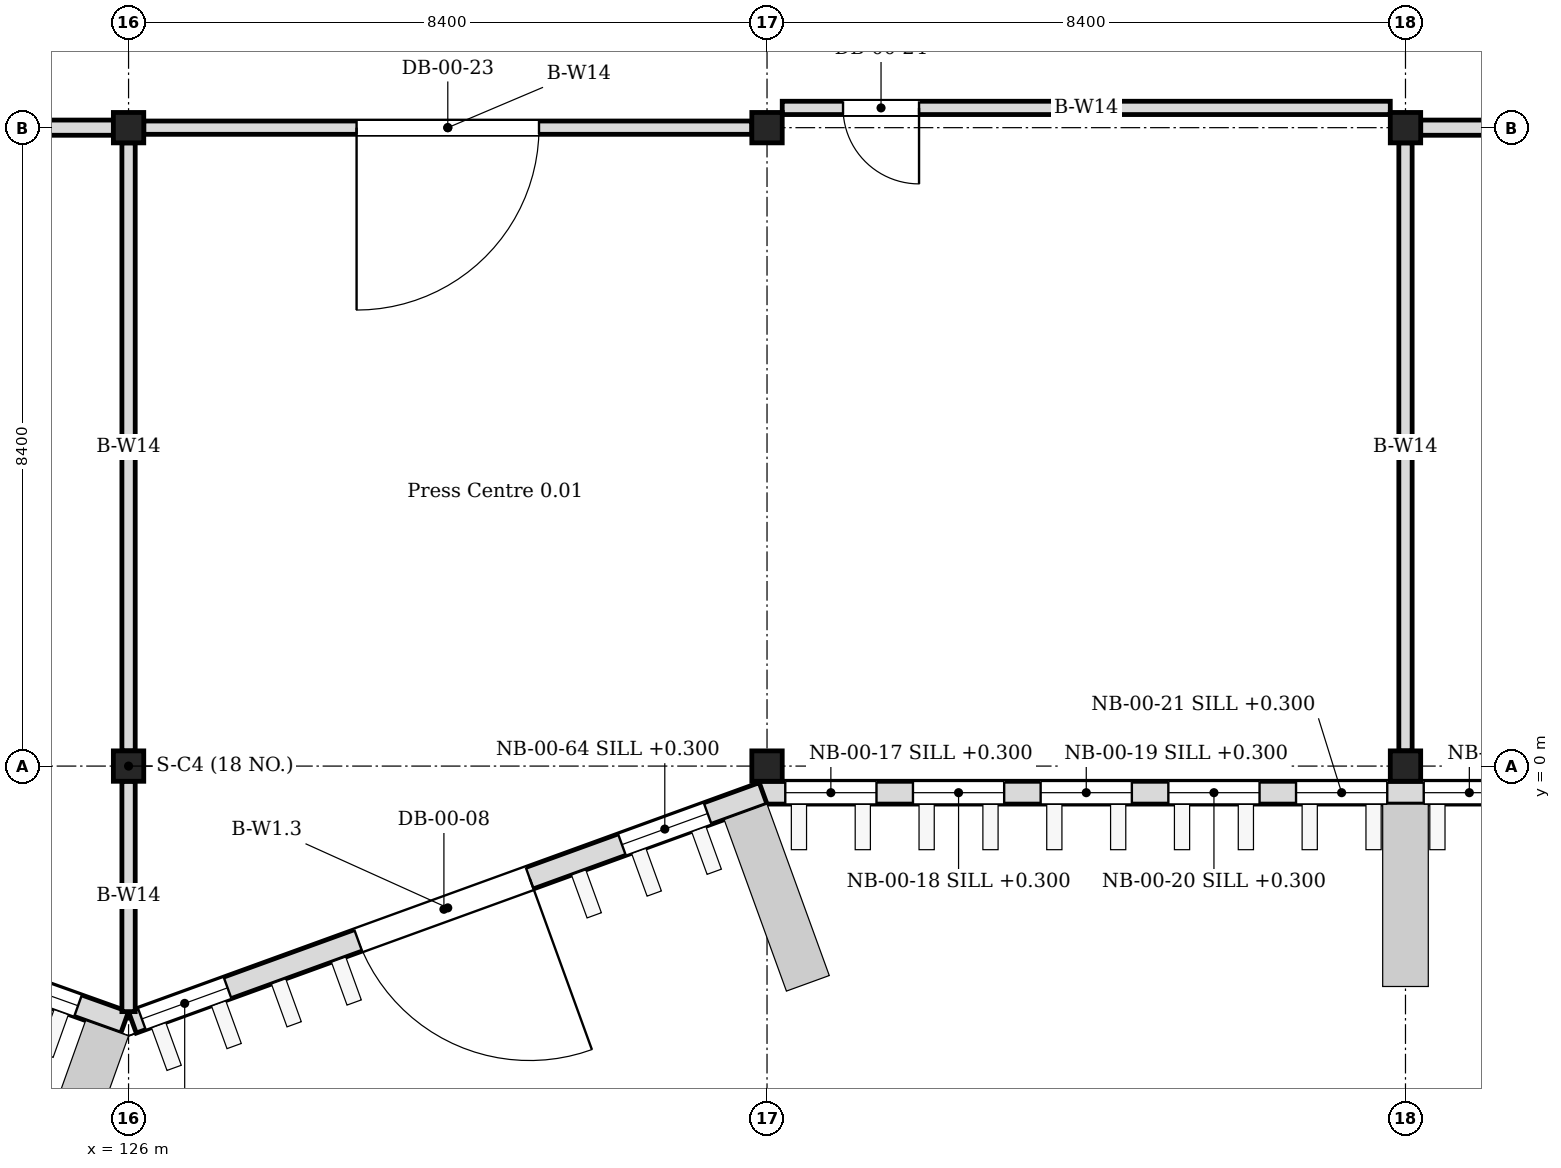
"""IFC4 building model, lengths in metres.
Left out: names, types, materials, properties, quantities, classifications, styles, units other than length and angle.
Written with IfcOpenShell. Run it as: python <this file> out.ifc"""

import sys

from ifc_helpers import new_model, si_unit, direction, frame, frame_2d, origin, origin_2d, place, context, subcontext, project, spatial, rectangle, i_section, extrude, element, fill, save


model = new_model("IFC4")
c1 = context("Model", 3, precision=1e-05, world=origin(), true_north=direction((0.0, 1.0)))
c2 = subcontext(c1, "Body", "Model", "MODEL_VIEW")
j1 = project(units=[si_unit("LENGTHUNIT", "METRE"), si_unit("PLANEANGLEUNIT", "RADIAN")], contexts=[c1])
p1 = place(None, origin())
s1 = spatial("IfcSite", under=j1, at=p1, CompositionType="ELEMENT")
p2 = place(p1, origin())
s2 = spatial("IfcBuilding", under=s1, at=p2, CompositionType="ELEMENT")
p3 = place(p2, origin())
s3 = spatial("IfcBuildingStorey", under=s2, at=p3, CompositionType="ELEMENT", Elevation=0.0)
for number, where, z_axis, x_axis in (
    (1, (126.0, 0.0, 0.0), (0.0, 0.0, 1.0), (1.0, 0.0, 0.0)),
    (2, (126.0, 8.4, 0.0), (0.0, 0.0, 1.0), (1.0, 0.0, 0.0)),
    (3, (134.4, 0.0, 0.0), (0.0, 0.0, 1.0), (1.0, 0.0, 0.0)),
    (4, (134.4, 8.4, 0.0), (0.0, 0.0, 1.0), (1.0, 0.0, 0.0)),
    (5, (142.8, 0.0, 0.0), (0.0, 0.0, 1.0), (1.0, 0.0, 0.0)),
    (6, (142.8, 8.4, 0.0), (0.0, 0.0, 1.0), (1.0, 0.0, 0.0)),
):
    element("IfcColumn", number, at=place(p3, frame(where, z_axis=z_axis, x_axis=x_axis)), inside=s3, PredefinedType="COLUMN", context=c2, shape_type="SweptSolid", body=[
        extrude(i_section(OverallWidth=0.4, OverallDepth=0.4, WebThickness=0.013, FlangeThickness=0.021, FilletRadius=0.022, at=origin_2d()), origin(), (0.0, 0.0, 1.0), 6.0),
    ])
p4 = place(p3, frame((134.3, -0.35, 0.0), z_axis=(0.0, 0.0, 1.0), x_axis=(1.0, 0.0, 0.0)))
e7 = element("IfcWall", 7, at=p4, inside=s3, PredefinedType="SOLIDWALL", context=c2, shape_type="SweptSolid", body=[
    extrude(rectangle(XDim=23.05, YDim=0.3, at=frame_2d((11.525, 0.0))), origin(), (0.0, 0.0, 1.0), 5.85),
])
p5 = place(p4, frame((0.34, 0.0, 0.3)))
e8 = element("IfcOpeningElement", 8, at=p5, cuts=e7, PredefinedType="OPENING", context=c2, shape_type="SweptSolid", body=[
    extrude(rectangle(XDim=1.2, YDim=4.2, at=frame_2d((0.6, 2.1))), frame((0.0, 0.16, 0.0), z_axis=(0.0, -1.0, 0.0), x_axis=(1.0, 0.0, 0.0)), (0.0, 0.0, 1.0), 0.32),
])
p6 = place(p4, frame((2.02, 0.0, 0.3)))
e9 = element("IfcOpeningElement", 9, at=p6, cuts=e7, PredefinedType="OPENING", context=c2, shape_type="SweptSolid", body=[
    extrude(rectangle(XDim=1.2, YDim=4.2, at=frame_2d((0.6, 2.1))), frame((0.0, 0.16, 0.0), z_axis=(0.0, -1.0, 0.0), x_axis=(1.0, 0.0, 0.0)), (0.0, 0.0, 1.0), 0.32),
])
p7 = place(p4, frame((3.7, 0.0, 0.3)))
e10 = element("IfcOpeningElement", 10, at=p7, cuts=e7, PredefinedType="OPENING", context=c2, shape_type="SweptSolid", body=[
    extrude(rectangle(XDim=1.2, YDim=4.2, at=frame_2d((0.6, 2.1))), frame((0.0, 0.16, 0.0), z_axis=(0.0, -1.0, 0.0), x_axis=(1.0, 0.0, 0.0)), (0.0, 0.0, 1.0), 0.32),
])
p8 = place(p4, frame((5.38, 0.0, 0.3)))
e11 = element("IfcOpeningElement", 11, at=p8, cuts=e7, PredefinedType="OPENING", context=c2, shape_type="SweptSolid", body=[
    extrude(rectangle(XDim=1.2, YDim=4.2, at=frame_2d((0.6, 2.1))), frame((0.0, 0.16, 0.0), z_axis=(0.0, -1.0, 0.0), x_axis=(1.0, 0.0, 0.0)), (0.0, 0.0, 1.0), 0.32),
])
p9 = place(p4, frame((7.06, 0.0, 0.3)))
e12 = element("IfcOpeningElement", 12, at=p9, cuts=e7, PredefinedType="OPENING", context=c2, shape_type="SweptSolid", body=[
    extrude(rectangle(XDim=1.2, YDim=4.2, at=frame_2d((0.6, 2.1))), frame((0.0, 0.16, 0.0), z_axis=(0.0, -1.0, 0.0), x_axis=(1.0, 0.0, 0.0)), (0.0, 0.0, 1.0), 0.32),
])
p10 = place(p4, frame((8.74, 0.0, 0.3)))
e13 = element("IfcOpeningElement", 13, at=p10, cuts=e7, PredefinedType="OPENING", context=c2, shape_type="SweptSolid", body=[
    extrude(rectangle(XDim=1.2, YDim=4.2, at=frame_2d((0.6, 2.1))), frame((0.0, 0.16, 0.0), z_axis=(0.0, -1.0, 0.0), x_axis=(1.0, 0.0, 0.0)), (0.0, 0.0, 1.0), 0.32),
])
p11 = place(p4, frame((10.42, 0.0, 0.3)))
e14 = element("IfcOpeningElement", 14, at=p11, cuts=e7, PredefinedType="OPENING", context=c2, shape_type="SweptSolid", body=[
    extrude(rectangle(XDim=1.2, YDim=4.2, at=frame_2d((0.6, 2.1))), frame((0.0, 0.16, 0.0), z_axis=(0.0, -1.0, 0.0), x_axis=(1.0, 0.0, 0.0)), (0.0, 0.0, 1.0), 0.32),
])
p12 = place(p4, frame((12.1, 0.0, 0.3)))
e15 = element("IfcOpeningElement", 15, at=p12, cuts=e7, PredefinedType="OPENING", context=c2, shape_type="SweptSolid", body=[
    extrude(rectangle(XDim=1.2, YDim=4.2, at=frame_2d((0.6, 2.1))), frame((0.0, 0.16, 0.0), z_axis=(0.0, -1.0, 0.0), x_axis=(1.0, 0.0, 0.0)), (0.0, 0.0, 1.0), 0.32),
])
p13 = place(p4, frame((13.78, 0.0, 0.3)))
e16 = element("IfcOpeningElement", 16, at=p13, cuts=e7, PredefinedType="OPENING", context=c2, shape_type="SweptSolid", body=[
    extrude(rectangle(XDim=1.2, YDim=4.2, at=frame_2d((0.6, 2.1))), frame((0.0, 0.16, 0.0), z_axis=(0.0, -1.0, 0.0), x_axis=(1.0, 0.0, 0.0)), (0.0, 0.0, 1.0), 0.32),
])
p14 = place(p4, frame((15.46, 0.0, 0.3)))
e17 = element("IfcOpeningElement", 17, at=p14, cuts=e7, PredefinedType="OPENING", context=c2, shape_type="SweptSolid", body=[
    extrude(rectangle(XDim=1.2, YDim=4.2, at=frame_2d((0.6, 2.1))), frame((0.0, 0.16, 0.0), z_axis=(0.0, -1.0, 0.0), x_axis=(1.0, 0.0, 0.0)), (0.0, 0.0, 1.0), 0.32),
])
p15 = place(p4, frame((17.14, 0.0, 0.3)))
e18 = element("IfcOpeningElement", 18, at=p15, cuts=e7, PredefinedType="OPENING", context=c2, shape_type="SweptSolid", body=[
    extrude(rectangle(XDim=1.2, YDim=4.2, at=frame_2d((0.6, 2.1))), frame((0.0, 0.16, 0.0), z_axis=(0.0, -1.0, 0.0), x_axis=(1.0, 0.0, 0.0)), (0.0, 0.0, 1.0), 0.32),
])
p16 = place(p4, frame((18.82, 0.0, 0.3)))
e19 = element("IfcOpeningElement", 19, at=p16, cuts=e7, PredefinedType="OPENING", context=c2, shape_type="SweptSolid", body=[
    extrude(rectangle(XDim=1.2, YDim=4.2, at=frame_2d((0.6, 2.1))), frame((0.0, 0.16, 0.0), z_axis=(0.0, -1.0, 0.0), x_axis=(1.0, 0.0, 0.0)), (0.0, 0.0, 1.0), 0.32),
])
p17 = place(p4, frame((20.5, 0.0, 0.3)))
e20 = element("IfcOpeningElement", 20, at=p17, cuts=e7, PredefinedType="OPENING", context=c2, shape_type="SweptSolid", body=[
    extrude(rectangle(XDim=1.2, YDim=4.2, at=frame_2d((0.6, 2.1))), frame((0.0, 0.16, 0.0), z_axis=(0.0, -1.0, 0.0), x_axis=(1.0, 0.0, 0.0)), (0.0, 0.0, 1.0), 0.32),
])
p18 = place(p3, frame((117.65, -0.409, 0.0), z_axis=(0.0, 0.0, 1.0), x_axis=(0.941744418946, -0.336329376334, 0.0)))
e21 = element("IfcWall", 21, at=p18, inside=s3, PredefinedType="SOLIDWALL", context=c2, shape_type="SweptSolid", body=[
    extrude(rectangle(XDim=8.812, YDim=0.3, at=frame_2d((4.406, 0.0))), origin(), (0.0, 0.0, 1.0), 5.85),
])
p19 = place(p18, frame((0.24, 0.0, 0.3)))
e22 = element("IfcOpeningElement", 22, at=p19, cuts=e21, PredefinedType="OPENING", context=c2, shape_type="SweptSolid", body=[
    extrude(rectangle(XDim=1.2, YDim=4.2, at=frame_2d((0.6, 2.1))), frame((0.0, 0.16, 0.0), z_axis=(0.0, -1.0, 0.0), x_axis=(1.0, 0.0, 0.0)), (0.0, 0.0, 1.0), 0.32),
])
p20 = place(p18, frame((1.92, 0.0, 0.3)))
e23 = element("IfcOpeningElement", 23, at=p20, cuts=e21, PredefinedType="OPENING", context=c2, shape_type="SweptSolid", body=[
    extrude(rectangle(XDim=1.2, YDim=4.2, at=frame_2d((0.6, 2.1))), frame((0.0, 0.16, 0.0), z_axis=(0.0, -1.0, 0.0), x_axis=(1.0, 0.0, 0.0)), (0.0, 0.0, 1.0), 0.32),
])
p21 = place(p18, frame((3.6, 0.0, 0.3)))
e24 = element("IfcOpeningElement", 24, at=p21, cuts=e21, PredefinedType="OPENING", context=c2, shape_type="SweptSolid", body=[
    extrude(rectangle(XDim=1.2, YDim=4.2, at=frame_2d((0.6, 2.1))), frame((0.0, 0.16, 0.0), z_axis=(0.0, -1.0, 0.0), x_axis=(1.0, 0.0, 0.0)), (0.0, 0.0, 1.0), 0.32),
])
p22 = place(p18, frame((5.28, 0.0, 0.3)))
e25 = element("IfcOpeningElement", 25, at=p22, cuts=e21, PredefinedType="OPENING", context=c2, shape_type="SweptSolid", body=[
    extrude(rectangle(XDim=1.2, YDim=4.2, at=frame_2d((0.6, 2.1))), frame((0.0, 0.16, 0.0), z_axis=(0.0, -1.0, 0.0), x_axis=(1.0, 0.0, 0.0)), (0.0, 0.0, 1.0), 0.32),
])
p23 = place(p18, frame((6.96, 0.0, 0.3)))
e26 = element("IfcOpeningElement", 26, at=p23, cuts=e21, PredefinedType="OPENING", context=c2, shape_type="SweptSolid", body=[
    extrude(rectangle(XDim=1.2, YDim=4.2, at=frame_2d((0.6, 2.1))), frame((0.0, 0.16, 0.0), z_axis=(0.0, -1.0, 0.0), x_axis=(1.0, 0.0, 0.0)), (0.0, 0.0, 1.0), 0.32),
])
p24 = place(p3, frame((126.05, -3.372, 0.0), z_axis=(0.0, 0.0, 1.0), x_axis=(0.939956409183, 0.3412945192, 0.0)))
e27 = element("IfcWall", 27, at=p24, inside=s3, PredefinedType="SOLIDWALL", context=c2, shape_type="SweptSolid", body=[
    extrude(rectangle(XDim=8.829, YDim=0.3, at=frame_2d((4.414, 0.0))), origin(), (0.0, 0.0, 1.0), 5.85),
])
p25 = place(p24, frame((3.16, 0.0, 0.0)))
e28 = element("IfcOpeningElement", 28, at=p25, cuts=e27, PredefinedType="OPENING", context=c2, shape_type="SweptSolid", body=[
    extrude(rectangle(XDim=2.4, YDim=2.6, at=frame_2d((1.2, 1.3))), frame((0.0, 0.16, 0.0), z_axis=(0.0, -1.0, 0.0), x_axis=(1.0, 0.0, 0.0)), (0.0, 0.0, 1.0), 0.32),
])
p26 = place(p24, frame((0.132, 0.0, 0.3)))
e29 = element("IfcOpeningElement", 29, at=p26, cuts=e27, PredefinedType="OPENING", context=c2, shape_type="SweptSolid", body=[
    extrude(rectangle(XDim=1.2, YDim=4.2, at=frame_2d((0.6, 2.1))), frame((0.0, 0.16, 0.0), z_axis=(0.0, -1.0, 0.0), x_axis=(1.0, 0.0, 0.0)), (0.0, 0.0, 1.0), 0.32),
])
p27 = place(p24, frame((6.852, 0.0, 0.3)))
e30 = element("IfcOpeningElement", 30, at=p27, cuts=e27, PredefinedType="OPENING", context=c2, shape_type="SweptSolid", body=[
    extrude(rectangle(XDim=1.2, YDim=4.2, at=frame_2d((0.6, 2.1))), frame((0.0, 0.16, 0.0), z_axis=(0.0, -1.0, 0.0), x_axis=(1.0, 0.0, 0.0)), (0.0, 0.0, 1.0), 0.32),
])
p28 = place(p3, frame((117.8, 8.4, 0.0), z_axis=(0.0, 0.0, 1.0), x_axis=(1.0, 0.0, 0.0)))
e31 = element("IfcWall", 31, at=p28, inside=s3, PredefinedType="PARTITIONING", context=c2, shape_type="SweptSolid", body=[
    extrude(rectangle(XDim=8.0, YDim=0.2, at=frame_2d((4.0, 0.0))), origin(), (0.0, 0.0, 1.0), 5.05),
])
p29 = place(p28, frame((3.0, 0.0, 0.0)))
e32 = element("IfcOpeningElement", 32, at=p29, cuts=e31, PredefinedType="OPENING", context=c2, shape_type="SweptSolid", body=[
    extrude(rectangle(XDim=2.0, YDim=2.7, at=frame_2d((1.0, 1.35))), frame((0.0, 0.11, 0.0), z_axis=(0.0, -1.0, 0.0), x_axis=(1.0, 0.0, 0.0)), (0.0, 0.0, 1.0), 0.22),
])
p30 = place(p3, frame((126.2, 8.4, 0.0), z_axis=(0.0, 0.0, 1.0), x_axis=(1.0, 0.0, 0.0)))
e33 = element("IfcWall", 33, at=p30, inside=s3, PredefinedType="PARTITIONING", context=c2, shape_type="SweptSolid", body=[
    extrude(rectangle(XDim=8.0, YDim=0.175, at=frame_2d((4.0, 0.0))), origin(), (0.0, 0.0, 1.0), 5.05),
])
p31 = place(p30, frame((2.8, 0.0, 0.0)))
e34 = element("IfcOpeningElement", 34, at=p31, cuts=e33, PredefinedType="OPENING", context=c2, shape_type="SweptSolid", body=[
    extrude(rectangle(XDim=2.4, YDim=2.2, at=frame_2d((1.2, 1.1))), frame((0.0, 0.097, 0.0), z_axis=(0.0, -1.0, 0.0), x_axis=(1.0, 0.0, 0.0)), (0.0, 0.0, 1.0), 0.195),
])
p32 = place(p3, frame((134.6, 8.66, 0.0), z_axis=(0.0, 0.0, 1.0), x_axis=(1.0, 0.0, 0.0)))
e35 = element("IfcWall", 35, at=p32, inside=s3, PredefinedType="PARTITIONING", context=c2, shape_type="SweptSolid", body=[
    extrude(rectangle(XDim=8.0, YDim=0.175, at=frame_2d((4.0, 0.0))), origin(), (0.0, 0.0, 1.0), 5.05),
])
p33 = place(p32, frame((0.8, 0.0, 0.0)))
e36 = element("IfcOpeningElement", 36, at=p33, cuts=e35, PredefinedType="OPENING", context=c2, shape_type="SweptSolid", body=[
    extrude(rectangle(XDim=1.0, YDim=2.1, at=frame_2d((0.5, 1.05))), frame((0.0, 0.097, 0.0), z_axis=(0.0, -1.0, 0.0), x_axis=(1.0, 0.0, 0.0)), (0.0, 0.0, 1.0), 0.195),
])
p34 = place(p3, frame((143.0, 8.4, 0.0), z_axis=(0.0, 0.0, 1.0), x_axis=(1.0, 0.0, 0.0)))
e37 = element("IfcWall", 37, at=p34, inside=s3, PredefinedType="PARTITIONING", context=c2, shape_type="SweptSolid", body=[
    extrude(rectangle(XDim=8.0, YDim=0.2, at=frame_2d((4.0, 0.0))), origin(), (0.0, 0.0, 1.0), 5.05),
])
p35 = place(p34, frame((3.1, 0.0, 0.0)))
e38 = element("IfcOpeningElement", 38, at=p35, cuts=e37, PredefinedType="OPENING", context=c2, shape_type="SweptSolid", body=[
    extrude(rectangle(XDim=1.8, YDim=2.1, at=frame_2d((0.9, 1.05))), frame((0.0, 0.11, 0.0), z_axis=(0.0, -1.0, 0.0), x_axis=(1.0, 0.0, 0.0)), (0.0, 0.0, 1.0), 0.22),
])
p36 = place(p3, frame((126.0, -3.231, 0.0), z_axis=(0.0, 0.0, 1.0), x_axis=(0.0, 1.0, 0.0)))
e39 = element("IfcWall", 39, at=p36, inside=s3, PredefinedType="PARTITIONING", context=c2, shape_type="SweptSolid", body=[
    extrude(rectangle(XDim=3.031, YDim=0.175, at=frame_2d((1.516, 0.0))), origin(), (0.0, 0.0, 1.0), 5.05),
])
for number, where, z_axis, x_axis in (
    (40, (126.0, 0.2, 0.0), (0.0, 0.0, 1.0), (0.0, 1.0, 0.0)),
    (41, (142.8, 0.2, 0.0), (0.0, 0.0, 1.0), (0.0, 1.0, 0.0)),
):
    element("IfcWall", number, at=place(p3, frame(where, z_axis=z_axis, x_axis=x_axis)), inside=s3, PredefinedType="PARTITIONING", context=c2, shape_type="SweptSolid", body=[
        extrude(rectangle(XDim=8.0, YDim=0.175, at=frame_2d((4.0, 0.0))), origin(), (0.0, 0.0, 1.0), 5.05),
    ])
p37 = place(p5, origin())
e42 = element("IfcWindow", 42, at=p37, inside=s3, PartitioningType="TRIPLE_PANEL_VERTICAL", PredefinedType="WINDOW", context=c2, shape_type="SweptSolid", body=[
    extrude(rectangle(XDim=1.2, YDim=4.2, at=frame_2d((0.6, 2.1))), frame((0.0, 0.03, 0.0), z_axis=(0.0, -1.0, 0.0), x_axis=(1.0, 0.0, 0.0)), (0.0, 0.0, 1.0), 0.06),
])
fill(e8, e42)
p38 = place(p6, origin())
e43 = element("IfcWindow", 43, at=p38, inside=s3, PartitioningType="TRIPLE_PANEL_VERTICAL", PredefinedType="WINDOW", context=c2, shape_type="SweptSolid", body=[
    extrude(rectangle(XDim=1.2, YDim=4.2, at=frame_2d((0.6, 2.1))), frame((0.0, 0.03, 0.0), z_axis=(0.0, -1.0, 0.0), x_axis=(1.0, 0.0, 0.0)), (0.0, 0.0, 1.0), 0.06),
])
fill(e9, e43)
p39 = place(p7, origin())
e44 = element("IfcWindow", 44, at=p39, inside=s3, PartitioningType="TRIPLE_PANEL_VERTICAL", PredefinedType="WINDOW", context=c2, shape_type="SweptSolid", body=[
    extrude(rectangle(XDim=1.2, YDim=4.2, at=frame_2d((0.6, 2.1))), frame((0.0, 0.03, 0.0), z_axis=(0.0, -1.0, 0.0), x_axis=(1.0, 0.0, 0.0)), (0.0, 0.0, 1.0), 0.06),
])
fill(e10, e44)
p40 = place(p8, origin())
e45 = element("IfcWindow", 45, at=p40, inside=s3, PartitioningType="TRIPLE_PANEL_VERTICAL", PredefinedType="WINDOW", context=c2, shape_type="SweptSolid", body=[
    extrude(rectangle(XDim=1.2, YDim=4.2, at=frame_2d((0.6, 2.1))), frame((0.0, 0.03, 0.0), z_axis=(0.0, -1.0, 0.0), x_axis=(1.0, 0.0, 0.0)), (0.0, 0.0, 1.0), 0.06),
])
fill(e11, e45)
p41 = place(p9, origin())
e46 = element("IfcWindow", 46, at=p41, inside=s3, PartitioningType="TRIPLE_PANEL_VERTICAL", PredefinedType="WINDOW", context=c2, shape_type="SweptSolid", body=[
    extrude(rectangle(XDim=1.2, YDim=4.2, at=frame_2d((0.6, 2.1))), frame((0.0, 0.03, 0.0), z_axis=(0.0, -1.0, 0.0), x_axis=(1.0, 0.0, 0.0)), (0.0, 0.0, 1.0), 0.06),
])
fill(e12, e46)
p42 = place(p10, origin())
e47 = element("IfcWindow", 47, at=p42, inside=s3, PartitioningType="TRIPLE_PANEL_VERTICAL", PredefinedType="WINDOW", context=c2, shape_type="SweptSolid", body=[
    extrude(rectangle(XDim=1.2, YDim=4.2, at=frame_2d((0.6, 2.1))), frame((0.0, 0.03, 0.0), z_axis=(0.0, -1.0, 0.0), x_axis=(1.0, 0.0, 0.0)), (0.0, 0.0, 1.0), 0.06),
])
fill(e13, e47)
p43 = place(p23, origin())
e48 = element("IfcWindow", 48, at=p43, inside=s3, PartitioningType="TRIPLE_PANEL_VERTICAL", PredefinedType="WINDOW", context=c2, shape_type="SweptSolid", body=[
    extrude(rectangle(XDim=1.2, YDim=4.2, at=frame_2d((0.6, 2.1))), frame((0.0, 0.03, 0.0), z_axis=(0.0, -1.0, 0.0), x_axis=(1.0, 0.0, 0.0)), (0.0, 0.0, 1.0), 0.06),
])
fill(e26, e48)
p44 = place(p25, origin())
e49 = element("IfcDoor", 49, at=p44, inside=s3, OperationType="DOUBLE_DOOR_SINGLE_SWING", PredefinedType="DOOR", context=c2, shape_type="SweptSolid", body=[
    extrude(rectangle(XDim=2.4, YDim=2.6, at=frame_2d((1.2, 1.3))), frame((0.0, 0.025, 0.0), z_axis=(0.0, -1.0, 0.0), x_axis=(1.0, 0.0, 0.0)), (0.0, 0.0, 1.0), 0.05),
])
fill(e28, e49)
p45 = place(p26, origin())
e50 = element("IfcWindow", 50, at=p45, inside=s3, PartitioningType="TRIPLE_PANEL_VERTICAL", PredefinedType="WINDOW", context=c2, shape_type="SweptSolid", body=[
    extrude(rectangle(XDim=1.2, YDim=4.2, at=frame_2d((0.6, 2.1))), frame((0.0, 0.03, 0.0), z_axis=(0.0, -1.0, 0.0), x_axis=(1.0, 0.0, 0.0)), (0.0, 0.0, 1.0), 0.06),
])
fill(e29, e50)
p46 = place(p27, origin())
e51 = element("IfcWindow", 51, at=p46, inside=s3, PartitioningType="TRIPLE_PANEL_VERTICAL", PredefinedType="WINDOW", context=c2, shape_type="SweptSolid", body=[
    extrude(rectangle(XDim=1.2, YDim=4.2, at=frame_2d((0.6, 2.1))), frame((0.0, 0.03, 0.0), z_axis=(0.0, -1.0, 0.0), x_axis=(1.0, 0.0, 0.0)), (0.0, 0.0, 1.0), 0.06),
])
fill(e30, e51)
p47 = place(p31, origin())
e52 = element("IfcDoor", 52, at=p47, inside=s3, OperationType="DOUBLE_DOOR_SINGLE_SWING", PredefinedType="DOOR", context=c2, shape_type="SweptSolid", body=[
    extrude(rectangle(XDim=2.4, YDim=2.2, at=frame_2d((1.2, 1.1))), frame((0.0, 0.025, 0.0), z_axis=(0.0, -1.0, 0.0), x_axis=(1.0, 0.0, 0.0)), (0.0, 0.0, 1.0), 0.05),
])
fill(e34, e52)
p48 = place(p33, origin())
e53 = element("IfcDoor", 53, at=p48, inside=s3, OperationType="SINGLE_SWING_LEFT", PredefinedType="DOOR", context=c2, shape_type="SweptSolid", body=[
    extrude(rectangle(XDim=1.0, YDim=2.1, at=frame_2d((0.5, 1.05))), frame((0.0, 0.025, 0.0), z_axis=(0.0, -1.0, 0.0), x_axis=(1.0, 0.0, 0.0)), (0.0, 0.0, 1.0), 0.05),
])
fill(e36, e53)
save(model, sys.argv[1])
